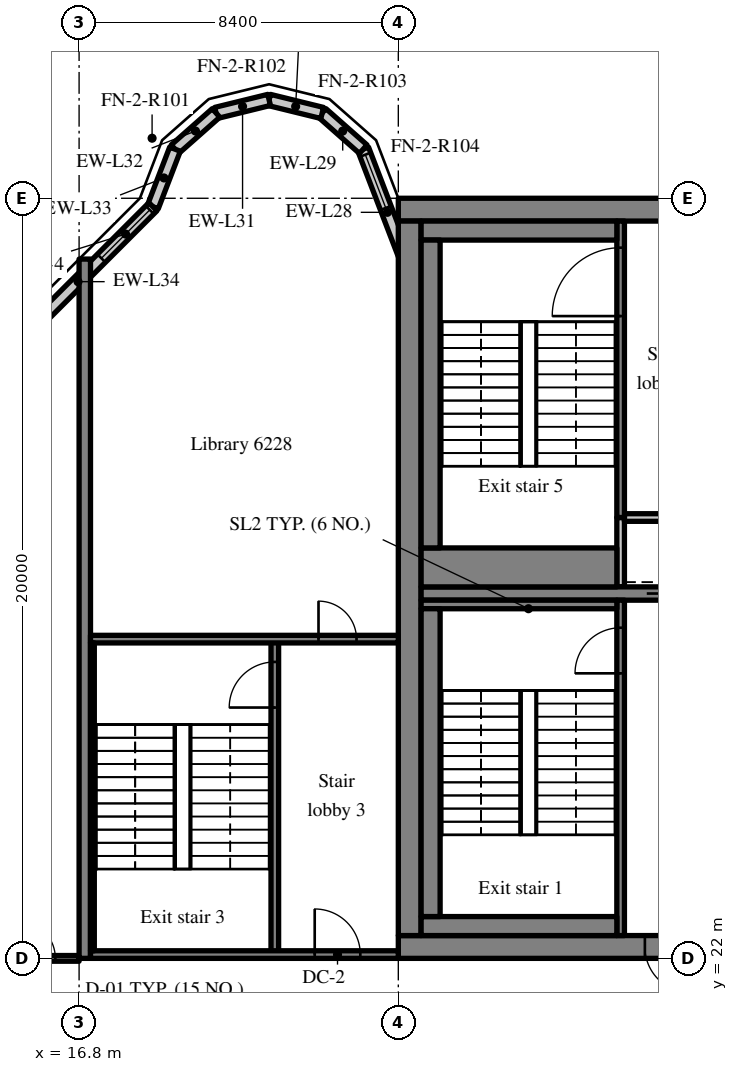
"""IFC4 building model, lengths in metres.
Left out: names, types, materials, properties, quantities, classifications, styles, units other than length and angle.
Written with IfcOpenShell. Run it as: python <this file> out.ifc"""

import sys

from ifc_helpers import new_model, si_unit, direction, frame, frame_2d, origin, place, context, subcontext, project, spatial, rectangle, extrude, source, transform, mapped, element, fill, save


model = new_model("IFC4")
c1 = context("Model", 3, precision=1e-05, world=origin(), true_north=direction((0.0, 1.0)))
c2 = subcontext(c1, "Body", "Model", "MODEL_VIEW")
j1 = project(units=[si_unit("LENGTHUNIT", "METRE"), si_unit("PLANEANGLEUNIT", "RADIAN")], contexts=[c1])
p1 = place(None, origin())
s1 = spatial("IfcSite", under=j1, at=p1, CompositionType="ELEMENT")
p2 = place(p1, origin())
s2 = spatial("IfcBuilding", under=s1, at=p2, CompositionType="ELEMENT")
p3 = place(p2, frame((0.0, 0.0, 256.9)))
s3 = spatial("IfcBuildingStorey", under=s2, at=p3, CompositionType="ELEMENT", Elevation=256.9)
m1 = source(origin(), c2, "Body", "SweptSolid", [
    extrude(rectangle(XDim=50.4, YDim=0.6, at=frame_2d((25.2, 0.0))), origin(), (0.0, 0.0, 1.0), 3.62),
])
p4 = place(p3, frame((25.2, 22.3, 0.0), z_axis=(0.0, 0.0, 1.0), x_axis=(1.0, 0.0, 0.0)))
e1 = element("IfcWall", 1, at=p4, inside=s3, PredefinedType="SHEAR", context=c2, shape_type="MappedRepresentation", body=[
    mapped(m1, transform((0.0, 0.0, 0.0), scale=1.0)),
])
m2 = source(origin(), c2, "Body", "SweptSolid", [
    extrude(rectangle(XDim=1.8, YDim=2.1, at=frame_2d((0.9, 1.05))), frame((0.0, 0.31, 0.0), z_axis=(0.0, -1.0, 0.0), x_axis=(1.0, 0.0, 0.0)), (0.0, 0.0, 1.0), 0.62),
])
p5 = place(p4, frame((15.9, 0.0, 0.0)))
e2 = element("IfcOpeningElement", 2, at=p5, cuts=e1, PredefinedType="OPENING", context=c2, shape_type="MappedRepresentation", body=[
    mapped(m2, transform((0.0, 0.0, 0.0), scale=1.0)),
])
m3 = source(origin(), c2, "Body", "SweptSolid", [
    extrude(rectangle(XDim=0.9, YDim=2.1, at=frame_2d((0.45, 1.05))), frame((0.0, 0.31, 0.0), z_axis=(0.0, -1.0, 0.0), x_axis=(1.0, 0.0, 0.0)), (0.0, 0.0, 1.0), 0.62),
])
p6 = place(p4, frame((21.513, 0.0, 0.0)))
e3 = element("IfcOpeningElement", 3, at=p6, cuts=e1, PredefinedType="OPENING", context=c2, shape_type="MappedRepresentation", body=[
    mapped(m3, transform((0.0, 0.0, 0.0), scale=1.0)),
])
p7 = place(p4, frame((32.7, 0.0, 0.0)))
e4 = element("IfcOpeningElement", 4, at=p7, cuts=e1, PredefinedType="OPENING", context=c2, shape_type="MappedRepresentation", body=[
    mapped(m2, transform((0.0, 0.0, 0.0), scale=1.0)),
])
m4 = source(origin(), c2, "Body", "SweptSolid", [
    extrude(rectangle(XDim=1.2, YDim=2.1, at=frame_2d((0.6, 1.05))), frame((0.0, 0.31, 0.0), z_axis=(0.0, -1.0, 0.0), x_axis=(1.0, 0.0, 0.0)), (0.0, 0.0, 1.0), 0.62),
])
p8 = place(p4, frame((6.488, 0.0, 0.0)))
e5 = element("IfcOpeningElement", 5, at=p8, cuts=e1, PredefinedType="OPENING", context=c2, shape_type="MappedRepresentation", body=[
    mapped(m4, transform((0.0, 0.0, 0.0), scale=1.0)),
])
p9 = place(p4, frame((47.925, 0.0, 0.0)))
e6 = element("IfcOpeningElement", 6, at=p9, cuts=e1, PredefinedType="OPENING", context=c2, shape_type="MappedRepresentation", body=[
    mapped(m4, transform((0.0, 0.0, 0.0), scale=1.0)),
])
p10 = place(p3, frame((25.2, 41.7, 0.0), z_axis=(0.0, 0.0, 1.0), x_axis=(1.0, 0.0, 0.0)))
e7 = element("IfcWall", 7, at=p10, inside=s3, PredefinedType="SHEAR", context=c2, shape_type="MappedRepresentation", body=[
    mapped(m1, transform((0.0, 0.0, 0.0), scale=1.0)),
])
m5 = source(origin(), c2, "Body", "SweptSolid", [
    extrude(rectangle(XDim=18.8, YDim=0.6, at=frame_2d((9.4, 0.0))), origin(), (0.0, 0.0, 1.0), 3.62),
])
p11 = place(p3, frame((25.5, 22.6, 0.0), z_axis=(0.0, 0.0, 1.0), x_axis=(0.0, 1.0, 0.0)))
e8 = element("IfcWall", 8, at=p11, inside=s3, PredefinedType="SHEAR", context=c2, shape_type="MappedRepresentation", body=[
    mapped(m5, transform((0.0, 0.0, 0.0), scale=1.0)),
])
m6 = source(origin(), c2, "Body", "SweptSolid", [
    extrude(rectangle(XDim=7.625, YDim=0.35, at=frame_2d((3.812, 0.0))), origin(), (0.0, 0.0, 1.0), 3.62),
])
p12 = place(p3, frame((25.8, 31.6, 0.0), z_axis=(0.0, 0.0, 1.0), x_axis=(1.0, 0.0, 0.0)))
e9 = element("IfcWall", 9, at=p12, inside=s3, PredefinedType="SHEAR", context=c2, shape_type="MappedRepresentation", body=[
    mapped(m6, transform((0.0, 0.0, 0.0), scale=1.0)),
])
m7 = source(origin(), c2, "Body", "SweptSolid", [
    extrude(rectangle(XDim=1.1, YDim=2.1, at=frame_2d((0.55, 1.05))), frame((0.0, 0.185, 0.0), z_axis=(0.0, -1.0, 0.0), x_axis=(1.0, 0.0, 0.0)), (0.0, 0.0, 1.0), 0.37),
])
p13 = place(p12, frame((5.938, 0.0, 0.0)))
e10 = element("IfcOpeningElement", 10, at=p13, cuts=e9, PredefinedType="OPENING", context=c2, shape_type="MappedRepresentation", body=[
    mapped(m7, transform((0.0, 0.0, 0.0), scale=1.0)),
])
m8 = source(origin(), c2, "Body", "SweptSolid", [
    extrude(rectangle(XDim=18.4, YDim=0.3, at=frame_2d((9.2, 0.0))), origin(), (0.0, 0.0, 1.0), 3.62),
])
p14 = place(p3, frame((16.95, 22.0, 0.0), z_axis=(0.0, 0.0, 1.0), x_axis=(0.0, 1.0, 0.0)))
e11 = element("IfcWall", 11, at=p14, inside=s3, PredefinedType="SHEAR", context=c2, shape_type="MappedRepresentation", body=[
    mapped(m8, transform((0.0, 0.0, 0.0), scale=1.0)),
])
m9 = source(origin(), c2, "Body", "SweptSolid", [
    extrude(rectangle(XDim=3.559, YDim=0.3, at=frame_2d((1.78, 0.0))), origin(), (0.0, 0.0, 1.0), 3.62),
])
p15 = place(p3, frame((25.55, 39.969, 0.0), z_axis=(0.0, 0.0, 1.0), x_axis=(-0.35779745313, 0.933799219604, 0.0)))
e12 = element("IfcWall", 12, at=p15, inside=s3, PredefinedType="SOLIDWALL", context=c2, shape_type="MappedRepresentation", body=[
    mapped(m9, transform((0.0, 0.0, 0.0), scale=1.0)),
])
m10 = source(origin(), c2, "Body", "SweptSolid", [
    extrude(rectangle(XDim=1.5, YDim=2.0, at=frame_2d((0.75, 1.0))), frame((0.0, 0.16, 0.0), z_axis=(0.0, -1.0, 0.0), x_axis=(1.0, 0.0, 0.0)), (0.0, 0.0, 1.0), 0.32),
])
p16 = place(p15, frame((1.903, 0.0, 0.9)))
e13 = element("IfcOpeningElement", 13, at=p16, cuts=e12, PredefinedType="OPENING", context=c2, shape_type="MappedRepresentation", body=[
    mapped(m10, transform((0.0, 0.0, 0.0), scale=1.0)),
])
m11 = source(origin(), c2, "Body", "SweptSolid", [
    extrude(rectangle(XDim=1.44, YDim=0.3, at=frame_2d((0.72, 0.0))), origin(), (0.0, 0.0, 1.0), 3.62),
])
p17 = place(p3, frame((24.277, 43.292, 0.0), z_axis=(0.0, 0.0, 1.0), x_axis=(-0.749649827867, 0.661834673902, 0.0)))
e14 = element("IfcWall", 14, at=p17, inside=s3, PredefinedType="SOLIDWALL", context=c2, shape_type="MappedRepresentation", body=[
    mapped(m11, transform((0.0, 0.0, 0.0), scale=1.0)),
])
m12 = source(origin(), c2, "Body", "SweptSolid", [
    extrude(rectangle(XDim=1.438, YDim=0.3, at=frame_2d((0.719, 0.0))), origin(), (0.0, 0.0, 1.0), 3.62),
])
p18 = place(p3, frame((23.197, 44.245, 0.0), z_axis=(0.0, 0.0, 1.0), x_axis=(-0.971152283879, 0.238460146601, 0.0)))
e15 = element("IfcWall", 15, at=p18, inside=s3, PredefinedType="SOLIDWALL", context=c2, shape_type="MappedRepresentation", body=[
    mapped(m12, transform((0.0, 0.0, 0.0), scale=1.0)),
])
m13 = source(origin(), c2, "Body", "SweptSolid", [
    extrude(rectangle(XDim=1.439, YDim=0.3, at=frame_2d((0.719, 0.0))), origin(), (0.0, 0.0, 1.0), 3.62),
])
p19 = place(p3, frame((21.8, 44.588, 0.0), z_axis=(0.0, 0.0, 1.0), x_axis=(-0.971161932466, -0.238420848351, 0.0)))
e16 = element("IfcWall", 16, at=p19, inside=s3, PredefinedType="SOLIDWALL", context=c2, shape_type="MappedRepresentation", body=[
    mapped(m13, transform((0.0, 0.0, 0.0), scale=1.0)),
])
m14 = source(origin(), c2, "Body", "SweptSolid", [
    extrude(rectangle(XDim=1.44, YDim=0.3, at=frame_2d((0.72, 0.0))), origin(), (0.0, 0.0, 1.0), 3.62),
])
p20 = place(p3, frame((20.403, 44.245, 0.0), z_axis=(0.0, 0.0, 1.0), x_axis=(-0.74957555648, -0.661918790432, 0.0)))
e17 = element("IfcWall", 17, at=p20, inside=s3, PredefinedType="SOLIDWALL", context=c2, shape_type="MappedRepresentation", body=[
    mapped(m14, transform((0.0, 0.0, 0.0), scale=1.0)),
])
m15 = source(origin(), c2, "Body", "SweptSolid", [
    extrude(rectangle(XDim=1.622, YDim=0.3, at=frame_2d((0.811, 0.0))), origin(), (0.0, 0.0, 1.0), 3.62),
])
p21 = place(p3, frame((19.323, 43.292, 0.0), z_axis=(0.0, 0.0, 1.0), x_axis=(-0.357778527068, -0.933806471154, 0.0)))
e18 = element("IfcWall", 18, at=p21, inside=s3, PredefinedType="SOLIDWALL", context=c2, shape_type="MappedRepresentation", body=[
    mapped(m15, transform((0.0, 0.0, 0.0), scale=1.0)),
])
m16 = source(origin(), c2, "Body", "SweptSolid", [
    extrude(rectangle(XDim=5.576, YDim=0.3, at=frame_2d((2.788, 0.0))), origin(), (0.0, 0.0, 1.0), 3.62),
])
p22 = place(p3, frame((18.743, 41.777, 0.0), z_axis=(0.0, 0.0, 1.0), x_axis=(-0.707106781187, -0.707106781187, 0.0)))
e19 = element("IfcWall", 19, at=p22, inside=s3, PredefinedType="SOLIDWALL", context=c2, shape_type="MappedRepresentation", body=[
    mapped(m16, transform((0.0, 0.0, 0.0), scale=1.0)),
])
m17 = source(origin(), c2, "Body", "SweptSolid", [
    extrude(rectangle(XDim=1.8, YDim=1.5, at=frame_2d((0.9, 0.75))), frame((0.0, 0.16, 0.0), z_axis=(0.0, -1.0, 0.0), x_axis=(1.0, 0.0, 0.0)), (0.0, 0.0, 1.0), 0.32),
])
p23 = place(p22, frame((0.118, 0.0, 0.9)))
e20 = element("IfcOpeningElement", 20, at=p23, cuts=e19, PredefinedType="OPENING", context=c2, shape_type="MappedRepresentation", body=[
    mapped(m17, transform((0.0, 0.0, 0.0), scale=1.0)),
])
m18 = source(origin(), c2, "Body", "SweptSolid", [
    extrude(rectangle(XDim=8.825, YDim=0.2, at=frame_2d((4.413, 0.0))), origin(), (0.0, 0.0, 1.0), 3.62),
])
p24 = place(p3, frame((31.05, 22.6, 0.0), z_axis=(0.0, 0.0, 1.0), x_axis=(0.0, 1.0, 0.0)))
e21 = element("IfcWall", 21, at=p24, inside=s3, PredefinedType="SOLIDWALL", context=c2, shape_type="MappedRepresentation", body=[
    mapped(m18, transform((0.0, 0.0, 0.0), scale=1.0)),
])
m19 = source(origin(), c2, "Body", "SweptSolid", [
    extrude(rectangle(XDim=1.2, YDim=2.1, at=frame_2d((0.6, 1.05))), frame((0.0, 0.11, 0.0), z_axis=(0.0, -1.0, 0.0), x_axis=(1.0, 0.0, 0.0)), (0.0, 0.0, 1.0), 0.22),
])
p25 = place(p24, frame((6.9, 0.0, 0.0)))
e22 = element("IfcOpeningElement", 22, at=p25, cuts=e21, PredefinedType="OPENING", context=c2, shape_type="MappedRepresentation", body=[
    mapped(m19, transform((0.0, 0.0, 0.0), scale=1.0)),
])
m20 = source(origin(), c2, "Body", "SweptSolid", [
    extrude(rectangle(XDim=1.825, YDim=0.2, at=frame_2d((0.913, 0.0))), origin(), (0.0, 0.0, 1.0), 3.62),
])
p26 = place(p3, frame((31.05, 31.775, 0.0), z_axis=(0.0, 0.0, 1.0), x_axis=(0.0, 1.0, 0.0)))
e23 = element("IfcWall", 23, at=p26, inside=s3, PredefinedType="SOLIDWALL", context=c2, shape_type="MappedRepresentation", body=[
    mapped(m20, transform((0.0, 0.0, 0.0), scale=1.0)),
])
m21 = source(origin(), c2, "Body", "SweptSolid", [
    extrude(rectangle(XDim=2.275, YDim=0.2, at=frame_2d((1.138, 0.0))), origin(), (0.0, 0.0, 1.0), 3.62),
])
p27 = place(p3, frame((31.15, 33.6, 0.0), z_axis=(0.0, 0.0, 1.0), x_axis=(1.0, 0.0, 0.0)))
e24 = element("IfcWall", 24, at=p27, inside=s3, PredefinedType="SOLIDWALL", context=c2, shape_type="MappedRepresentation", body=[
    mapped(m21, transform((0.0, 0.0, 0.0), scale=1.0)),
])
m22 = source(origin(), c2, "Body", "SweptSolid", [
    extrude(rectangle(XDim=7.8, YDim=0.2, at=frame_2d((3.9, 0.0))), origin(), (0.0, 0.0, 1.0), 3.62),
])
p28 = place(p3, frame((31.05, 33.6, 0.0), z_axis=(0.0, 0.0, 1.0), x_axis=(0.0, 1.0, 0.0)))
e25 = element("IfcWall", 25, at=p28, inside=s3, PredefinedType="SOLIDWALL", context=c2, shape_type="MappedRepresentation", body=[
    mapped(m22, transform((0.0, 0.0, 0.0), scale=1.0)),
])
m23 = source(origin(), c2, "Body", "SweptSolid", [
    extrude(rectangle(XDim=1.8, YDim=2.1, at=frame_2d((0.9, 1.05))), frame((0.0, 0.11, 0.0), z_axis=(0.0, -1.0, 0.0), x_axis=(1.0, 0.0, 0.0)), (0.0, 0.0, 1.0), 0.22),
])
p29 = place(p28, frame((5.3, 0.0, 0.0)))
e26 = element("IfcOpeningElement", 26, at=p29, cuts=e25, PredefinedType="OPENING", context=c2, shape_type="MappedRepresentation", body=[
    mapped(m23, transform((0.0, 0.0, 0.0), scale=1.0)),
])
m24 = source(origin(), c2, "Body", "SweptSolid", [
    extrude(rectangle(XDim=8.3, YDim=0.2, at=frame_2d((4.15, 0.0))), origin(), (0.0, 0.0, 1.0), 3.62),
])
p30 = place(p3, frame((21.95, 22.1, 0.0), z_axis=(0.0, 0.0, 1.0), x_axis=(0.0, 1.0, 0.0)))
e27 = element("IfcWall", 27, at=p30, inside=s3, PredefinedType="SOLIDWALL", context=c2, shape_type="MappedRepresentation", body=[
    mapped(m24, transform((0.0, 0.0, 0.0), scale=1.0)),
])
p31 = place(p30, frame((6.5, 0.0, 0.0)))
e28 = element("IfcOpeningElement", 28, at=p31, cuts=e27, PredefinedType="OPENING", context=c2, shape_type="MappedRepresentation", body=[
    mapped(m19, transform((0.0, 0.0, 0.0), scale=1.0)),
])
m25 = source(origin(), c2, "Body", "SweptSolid", [
    extrude(rectangle(XDim=8.1, YDim=0.2, at=frame_2d((4.05, 0.0))), origin(), (0.0, 0.0, 1.0), 3.62),
])
p32 = place(p3, frame((17.1, 22.1, 0.0), z_axis=(0.0, 0.0, 1.0), x_axis=(1.0, 0.0, 0.0)))
e29 = element("IfcWall", 29, at=p32, inside=s3, PredefinedType="SOLIDWALL", context=c2, shape_type="MappedRepresentation", body=[
    mapped(m25, transform((0.0, 0.0, 0.0), scale=1.0)),
])
p33 = place(p32, frame((5.9, 0.0, 0.0)))
e30 = element("IfcOpeningElement", 30, at=p33, cuts=e29, PredefinedType="OPENING", context=c2, shape_type="MappedRepresentation", body=[
    mapped(m19, transform((0.0, 0.0, 0.0), scale=1.0)),
])
p34 = place(p3, frame((17.1, 30.4, 0.0), z_axis=(0.0, 0.0, 1.0), x_axis=(1.0, 0.0, 0.0)))
e31 = element("IfcWall", 31, at=p34, inside=s3, PredefinedType="SOLIDWALL", context=c2, shape_type="MappedRepresentation", body=[
    mapped(m25, transform((0.0, 0.0, 0.0), scale=1.0)),
])
m26 = source(origin(), c2, "Body", "SweptSolid", [
    extrude(rectangle(XDim=1.0, YDim=2.1, at=frame_2d((0.5, 1.05))), frame((0.0, 0.11, 0.0), z_axis=(0.0, -1.0, 0.0), x_axis=(1.0, 0.0, 0.0)), (0.0, 0.0, 1.0), 0.22),
])
p35 = place(p34, frame((6.0, 0.0, 0.0)))
e32 = element("IfcOpeningElement", 32, at=p35, cuts=e31, PredefinedType="OPENING", context=c2, shape_type="MappedRepresentation", body=[
    mapped(m26, transform((0.0, 0.0, 0.0), scale=1.0)),
])
m27 = source(origin(), c2, "Body", "SweptSolid", [
    extrude(rectangle(XDim=5.15, YDim=0.5, at=frame_2d((2.575, 0.0))), origin(), (0.0, 0.0, 1.0), 3.62),
])
p36 = place(p3, frame((25.8, 22.85, 0.0), z_axis=(0.0, 0.0, 1.0), x_axis=(1.0, 0.0, 0.0)))
e33 = element("IfcWall", 33, at=p36, inside=s3, PredefinedType="SOLIDWALL", context=c2, shape_type="MappedRepresentation", body=[
    mapped(m27, transform((0.0, 0.0, 0.0), scale=1.0)),
])
m28 = source(origin(), c2, "Body", "SweptSolid", [
    extrude(rectangle(XDim=5.15, YDim=0.225, at=frame_2d((2.575, 0.0))), origin(), (0.0, 0.0, 1.0), 3.62),
])
p37 = place(p3, frame((25.8, 31.312, 0.0), z_axis=(0.0, 0.0, 1.0), x_axis=(1.0, 0.0, 0.0)))
e34 = element("IfcWall", 34, at=p37, inside=s3, PredefinedType="SOLIDWALL", context=c2, shape_type="MappedRepresentation", body=[
    mapped(m28, transform((0.0, 0.0, 0.0), scale=1.0)),
])
m29 = source(origin(), c2, "Body", "SweptSolid", [
    extrude(rectangle(XDim=8.1, YDim=0.5, at=frame_2d((4.05, 0.0))), origin(), (0.0, 0.0, 1.0), 3.62),
])
p38 = place(p3, frame((26.05, 23.1, 0.0), z_axis=(0.0, 0.0, 1.0), x_axis=(0.0, 1.0, 0.0)))
e35 = element("IfcWall", 35, at=p38, inside=s3, PredefinedType="SOLIDWALL", context=c2, shape_type="MappedRepresentation", body=[
    mapped(m29, transform((0.0, 0.0, 0.0), scale=1.0)),
])
m30 = source(origin(), c2, "Body", "SweptSolid", [
    extrude(rectangle(XDim=8.1, YDim=0.1, at=frame_2d((4.05, 0.0))), origin(), (0.0, 0.0, 1.0), 3.62),
])
p39 = place(p3, frame((17.15, 22.2, 0.0), z_axis=(0.0, 0.0, 1.0), x_axis=(0.0, 1.0, 0.0)))
e36 = element("IfcWall", 36, at=p39, inside=s3, PredefinedType="SOLIDWALL", context=c2, shape_type="MappedRepresentation", body=[
    mapped(m30, transform((0.0, 0.0, 0.0), scale=1.0)),
])
p40 = place(p3, frame((25.8, 41.15, 0.0), z_axis=(0.0, 0.0, 1.0), x_axis=(1.0, 0.0, 0.0)))
e37 = element("IfcWall", 37, at=p40, inside=s3, PredefinedType="SOLIDWALL", context=c2, shape_type="MappedRepresentation", body=[
    mapped(m27, transform((0.0, 0.0, 0.0), scale=1.0)),
])
m31 = source(origin(), c2, "Body", "SweptSolid", [
    extrude(rectangle(XDim=5.15, YDim=1.025, at=frame_2d((2.575, 0.0))), origin(), (0.0, 0.0, 1.0), 3.62),
])
p41 = place(p3, frame((25.8, 32.287, 0.0), z_axis=(0.0, 0.0, 1.0), x_axis=(1.0, 0.0, 0.0)))
e38 = element("IfcWall", 38, at=p41, inside=s3, PredefinedType="SOLIDWALL", context=c2, shape_type="MappedRepresentation", body=[
    mapped(m31, transform((0.0, 0.0, 0.0), scale=1.0)),
])
p42 = place(p3, frame((26.05, 32.8, 0.0), z_axis=(0.0, 0.0, 1.0), x_axis=(0.0, 1.0, 0.0)))
e39 = element("IfcWall", 39, at=p42, inside=s3, PredefinedType="SOLIDWALL", context=c2, shape_type="MappedRepresentation", body=[
    mapped(m29, transform((0.0, 0.0, 0.0), scale=1.0)),
])
m32 = source(origin(), c2, "Body", "SweptSolid", [
    extrude(rectangle(XDim=1.9, YDim=0.15, at=frame_2d((0.95, 0.0))), origin(), (0.0, 0.0, 1.0), 2.92),
])
p43 = place(p3, frame((14.9, 22.0, 0.0), z_axis=(0.0, 0.0, 1.0), x_axis=(1.0, 0.0, 0.0)))
e40 = element("IfcWall", 40, at=p43, inside=s3, PredefinedType="PARTITIONING", context=c2, shape_type="MappedRepresentation", body=[
    mapped(m32, transform((0.0, 0.0, 0.0), scale=1.0)),
])
m33 = source(origin(), c2, "Body", "SweptSolid", [
    extrude(rectangle(XDim=1.0, YDim=2.1, at=frame_2d((0.5, 1.05))), frame((0.0, 0.085, 0.0), z_axis=(0.0, -1.0, 0.0), x_axis=(1.0, 0.0, 0.0)), (0.0, 0.0, 1.0), 0.17),
])
p44 = place(p43, frame((0.275, 0.0, 0.0)))
e41 = element("IfcOpeningElement", 41, at=p44, cuts=e40, PredefinedType="OPENING", context=c2, shape_type="MappedRepresentation", body=[
    mapped(m33, transform((0.0, 0.0, 0.0), scale=1.0)),
])
m34 = source(origin(), c2, "Body", "SweptSolid", [
    extrude(rectangle(XDim=1.5, YDim=2.0, at=frame_2d((0.75, 1.0))), frame((0.0, 0.03, 0.0), z_axis=(0.0, -1.0, 0.0), x_axis=(1.0, 0.0, 0.0)), (0.0, 0.0, 1.0), 0.06),
])
p45 = place(p16, origin())
e42 = element("IfcWindow", 42, at=p45, inside=s3, PartitioningType="SINGLE_PANEL", PredefinedType="WINDOW", context=c2, shape_type="MappedRepresentation", body=[
    mapped(m34, transform((0.0, 0.0, 0.0), scale=1.0)),
])
fill(e13, e42)
m35 = source(origin(), c2, "Body", "SweptSolid", [
    extrude(rectangle(XDim=1.8, YDim=1.5, at=frame_2d((0.9, 0.75))), frame((0.0, 0.03, 0.0), z_axis=(0.0, -1.0, 0.0), x_axis=(1.0, 0.0, 0.0)), (0.0, 0.0, 1.0), 0.06),
])
p46 = place(p23, origin())
e43 = element("IfcWindow", 43, at=p46, inside=s3, PartitioningType="SINGLE_PANEL", PredefinedType="WINDOW", context=c2, shape_type="MappedRepresentation", body=[
    mapped(m35, transform((0.0, 0.0, 0.0), scale=1.0)),
])
fill(e20, e43)
m36 = source(origin(), c2, "Body", "SweptSolid", [
    extrude(rectangle(XDim=1.2, YDim=2.1, at=frame_2d((0.6, 1.05))), frame((0.0, 0.025, 0.0), z_axis=(0.0, -1.0, 0.0), x_axis=(1.0, 0.0, 0.0)), (0.0, 0.0, 1.0), 0.05),
])
p47 = place(p25, origin())
e44 = element("IfcDoor", 44, at=p47, inside=s3, OperationType="SINGLE_SWING_LEFT", PredefinedType="DOOR", context=c2, shape_type="MappedRepresentation", body=[
    mapped(m36, transform((0.0, 0.0, 0.0), scale=1.0)),
])
fill(e22, e44)
m37 = source(origin(), c2, "Body", "SweptSolid", [
    extrude(rectangle(XDim=1.2, YDim=2.1, at=frame_2d((0.6, 1.05))), frame((0.0, 0.225, 0.0), z_axis=(0.0, -1.0, 0.0), x_axis=(1.0, 0.0, 0.0)), (0.0, 0.0, 1.0), 0.05),
])
p48 = place(p8, origin())
e45 = element("IfcDoor", 45, at=p48, inside=s3, OperationType="SINGLE_SWING_RIGHT", PredefinedType="DOOR", context=c2, shape_type="MappedRepresentation", body=[
    mapped(m37, transform((0.0, 0.0, 0.0), scale=1.0)),
])
fill(e5, e45)
m38 = source(origin(), c2, "Body", "SweptSolid", [
    extrude(rectangle(XDim=1.1, YDim=2.1, at=frame_2d((0.55, 1.05))), frame((0.0, 0.025, 0.0), z_axis=(0.0, -1.0, 0.0), x_axis=(1.0, 0.0, 0.0)), (0.0, 0.0, 1.0), 0.05),
])
p49 = place(p13, origin())
e46 = element("IfcDoor", 46, at=p49, inside=s3, OperationType="SLIDING_TO_RIGHT", PredefinedType="DOOR", context=c2, shape_type="MappedRepresentation", body=[
    mapped(m38, transform((0.0, 0.0, 0.0), scale=1.0)),
])
fill(e10, e46)
m39 = source(origin(), c2, "Body", "SweptSolid", [
    extrude(rectangle(XDim=1.8, YDim=2.1, at=frame_2d((0.9, 1.05))), frame((0.0, 0.025, 0.0), z_axis=(0.0, -1.0, 0.0), x_axis=(1.0, 0.0, 0.0)), (0.0, 0.0, 1.0), 0.05),
])
p50 = place(p29, origin())
e47 = element("IfcDoor", 47, at=p50, inside=s3, OperationType="SINGLE_SWING_LEFT", PredefinedType="DOOR", context=c2, shape_type="MappedRepresentation", body=[
    mapped(m39, transform((0.0, 0.0, 0.0), scale=1.0)),
])
fill(e26, e47)
p51 = place(p31, origin())
e48 = element("IfcDoor", 48, at=p51, inside=s3, OperationType="SINGLE_SWING_LEFT", PredefinedType="DOOR", context=c2, shape_type="MappedRepresentation", body=[
    mapped(m36, transform((0.0, 0.0, 0.0), scale=1.0)),
])
fill(e28, e48)
p52 = place(p33, origin())
e49 = element("IfcDoor", 49, at=p52, inside=s3, OperationType="SINGLE_SWING_LEFT", PredefinedType="DOOR", context=c2, shape_type="MappedRepresentation", body=[
    mapped(m36, transform((0.0, 0.0, 0.0), scale=1.0)),
])
fill(e30, e49)
m40 = source(origin(), c2, "Body", "SweptSolid", [
    extrude(rectangle(XDim=1.0, YDim=2.1, at=frame_2d((0.5, 1.05))), frame((0.0, 0.025, 0.0), z_axis=(0.0, -1.0, 0.0), x_axis=(1.0, 0.0, 0.0)), (0.0, 0.0, 1.0), 0.05),
])
p53 = place(p35, origin())
e50 = element("IfcDoor", 50, at=p53, inside=s3, OperationType="SINGLE_SWING_LEFT", PredefinedType="DOOR", context=c2, shape_type="MappedRepresentation", body=[
    mapped(m40, transform((0.0, 0.0, 0.0), scale=1.0)),
])
fill(e32, e50)
p54 = place(p44, origin())
e51 = element("IfcDoor", 51, at=p54, inside=s3, OperationType="SINGLE_SWING_LEFT", PredefinedType="DOOR", context=c2, shape_type="MappedRepresentation", body=[
    mapped(m40, transform((0.0, 0.0, 0.0), scale=1.0)),
])
fill(e41, e51)
save(model, sys.argv[1])
